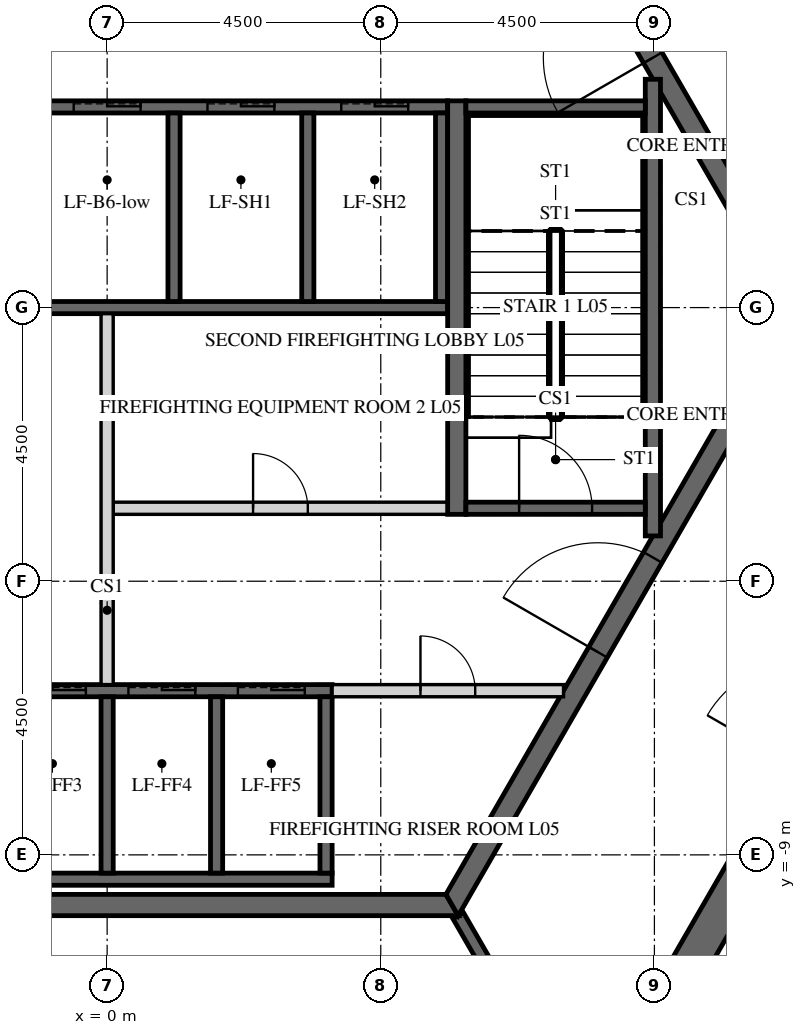
"""IFC4 building model, lengths in metres.
Left out: names, types, materials, properties, quantities, classifications, styles, units other than length and angle.
Written with IfcOpenShell. Run it as: python <this file> out.ifc"""

import sys

from ifc_helpers import new_model, si_unit, direction, frame, frame_2d, origin, place, context, subcontext, project, spatial, polyline, rectangle, outline, extrude, element, fill, save


model = new_model("IFC4")
c1 = context("Model", 3, precision=1e-05, world=origin(), true_north=direction((0.0, 1.0)))
c2 = subcontext(c1, "Body", "Model", "MODEL_VIEW")
j1 = project(units=[si_unit("LENGTHUNIT", "METRE"), si_unit("PLANEANGLEUNIT", "RADIAN")], contexts=[c1])
p1 = place(None, origin())
s1 = spatial("IfcSite", under=j1, at=p1, CompositionType="ELEMENT")
p2 = place(p1, origin())
s2 = spatial("IfcBuilding", under=s1, at=p2, CompositionType="ELEMENT")
p3 = place(p2, frame((0.0, 0.0, 31.5)))
s3 = spatial("IfcBuildingStorey", under=s2, at=p3, CompositionType="ELEMENT", Elevation=31.5)
p4 = place(p3, frame((7.91, -13.7, -0.3), z_axis=(0.0, 0.0, 1.0), x_axis=(0.499999880136, 0.866025472988, 0.0)))
e1 = element("IfcWall", 1, at=p4, inside=s3, PredefinedType="SHEAR", context=c2, shape_type="SweptSolid", body=[
    extrude(outline(polyline([(-0.173, -0.3), (15.993, -0.3), (15.646, 0.3), (0.173, 0.3), (-0.173, -0.3)])), origin(), (0.0, 0.0, 1.0), 6.15),
])
p5 = place(p4, frame((7.039, 0.0, 0.3)))
e2 = element("IfcOpeningElement", 2, at=p5, cuts=e1, PredefinedType="OPENING", context=c2, shape_type="SweptSolid", body=[
    extrude(rectangle(XDim=1.8, YDim=2.4, at=frame_2d((0.9, 1.2))), frame((0.0, 0.31, 0.0), z_axis=(0.0, -1.0, 0.0), x_axis=(1.0, 0.0, 0.0)), (0.0, 0.0, 1.0), 0.62),
])
p6 = place(p3, frame((15.819, 0.0, -0.3), z_axis=(0.0, 0.0, 1.0), x_axis=(-0.499999880136, 0.866025472988, 0.0)))
e3 = element("IfcWall", 3, at=p6, inside=s3, PredefinedType="SHEAR", context=c2, shape_type="SweptSolid", body=[
    extrude(outline(polyline([(-0.173, -0.3), (15.993, -0.3), (15.646, 0.3), (0.173, 0.3), (-0.173, -0.3)])), origin(), (0.0, 0.0, 1.0), 6.15),
])
p7 = place(p6, frame((6.981, 0.0, 0.3)))
e4 = element("IfcOpeningElement", 4, at=p7, cuts=e3, PredefinedType="OPENING", context=c2, shape_type="SweptSolid", body=[
    extrude(rectangle(XDim=1.8, YDim=2.4, at=frame_2d((0.9, 1.2))), frame((0.0, 0.31, 0.0), z_axis=(0.0, -1.0, 0.0), x_axis=(1.0, 0.0, 0.0)), (0.0, 0.0, 1.0), 0.62),
])
p8 = place(p3, frame((-5.673, -9.825, -0.3), z_axis=(0.0, 0.0, 1.0), x_axis=(1.0, 0.0, 0.0)))
e5 = element("IfcWall", 5, at=p8, inside=s3, PredefinedType="SHEAR", context=c2, shape_type="SweptSolid", body=[
    extrude(outline(polyline([(-0.101, -0.175), (11.446, -0.175), (11.244, 0.175), (0.101, 0.175), (-0.101, -0.175)])), origin(), (0.0, 0.0, 1.0), 6.15),
])
p9 = place(p3, frame((5.673, -9.825, -0.3), z_axis=(0.0, 0.0, 1.0), x_axis=(0.499995046907, 0.866028263435, 0.0)))
e6 = element("IfcWall", 6, at=p9, inside=s3, PredefinedType="SHEAR", context=c2, shape_type="SweptSolid", body=[
    extrude(outline(polyline([(-0.101, -0.175), (11.446, -0.175), (11.244, 0.175), (0.101, 0.175), (-0.101, -0.175)])), origin(), (0.0, 0.0, 1.0), 6.15),
])
p10 = place(p9, frame((4.801, 0.0, 0.3)))
e7 = element("IfcOpeningElement", 7, at=p10, cuts=e6, PredefinedType="OPENING", context=c2, shape_type="SweptSolid", body=[
    extrude(rectangle(XDim=1.8, YDim=2.4, at=frame_2d((0.9, 1.2))), frame((0.0, 0.185, 0.0), z_axis=(0.0, -1.0, 0.0), x_axis=(1.0, 0.0, 0.0)), (0.0, 0.0, 1.0), 0.37),
])
p11 = place(p3, frame((11.345, 0.0, -0.3), z_axis=(0.0, 0.0, 1.0), x_axis=(-0.499995046907, 0.866028263435, 0.0)))
e8 = element("IfcWall", 8, at=p11, inside=s3, PredefinedType="SHEAR", context=c2, shape_type="SweptSolid", body=[
    extrude(outline(polyline([(-0.101, -0.175), (11.446, -0.175), (11.244, 0.175), (0.101, 0.175), (-0.101, -0.175)])), origin(), (0.0, 0.0, 1.0), 6.15),
])
p12 = place(p11, frame((4.744, 0.0, 0.3)))
e9 = element("IfcOpeningElement", 9, at=p12, cuts=e8, PredefinedType="OPENING", context=c2, shape_type="SweptSolid", body=[
    extrude(rectangle(XDim=1.8, YDim=2.4, at=frame_2d((0.9, 1.2))), frame((0.0, 0.185, 0.0), z_axis=(0.0, -1.0, 0.0), x_axis=(1.0, 0.0, 0.0)), (0.0, 0.0, 1.0), 0.37),
])
p13 = place(p3, frame((-5.6, 3.3, -0.25), z_axis=(0.0, 0.0, 1.0), x_axis=(1.0, 0.0, 0.0)))
e10 = element("IfcWall", 10, at=p13, inside=s3, PredefinedType="SHEAR", context=c2, shape_type="SweptSolid", body=[
    extrude(rectangle(XDim=11.2, YDim=0.2, at=frame_2d((5.6, 0.0))), origin(), (0.0, 0.0, 1.0), 6.0),
])
p14 = place(p13, frame((0.65, 0.0, 0.25)))
e11 = element("IfcOpeningElement", 11, at=p14, cuts=e10, PredefinedType="OPENING", context=c2, shape_type="SweptSolid", body=[
    extrude(rectangle(XDim=1.1, YDim=2.1, at=frame_2d((0.55, 1.05))), frame((0.0, 0.11, 0.0), z_axis=(0.0, -1.0, 0.0), x_axis=(1.0, 0.0, 0.0)), (0.0, 0.0, 1.0), 0.22),
])
p15 = place(p13, frame((2.85, 0.0, 0.25)))
e12 = element("IfcOpeningElement", 12, at=p15, cuts=e10, PredefinedType="OPENING", context=c2, shape_type="SweptSolid", body=[
    extrude(rectangle(XDim=1.1, YDim=2.1, at=frame_2d((0.55, 1.05))), frame((0.0, 0.11, 0.0), z_axis=(0.0, -1.0, 0.0), x_axis=(1.0, 0.0, 0.0)), (0.0, 0.0, 1.0), 0.22),
])
p16 = place(p13, frame((5.05, 0.0, 0.25)))
e13 = element("IfcOpeningElement", 13, at=p16, cuts=e10, PredefinedType="OPENING", context=c2, shape_type="SweptSolid", body=[
    extrude(rectangle(XDim=1.1, YDim=2.1, at=frame_2d((0.55, 1.05))), frame((0.0, 0.11, 0.0), z_axis=(0.0, -1.0, 0.0), x_axis=(1.0, 0.0, 0.0)), (0.0, 0.0, 1.0), 0.22),
])
p17 = place(p13, frame((7.25, 0.0, 0.25)))
e14 = element("IfcOpeningElement", 14, at=p17, cuts=e10, PredefinedType="OPENING", context=c2, shape_type="SweptSolid", body=[
    extrude(rectangle(XDim=1.1, YDim=2.1, at=frame_2d((0.55, 1.05))), frame((0.0, 0.11, 0.0), z_axis=(0.0, -1.0, 0.0), x_axis=(1.0, 0.0, 0.0)), (0.0, 0.0, 1.0), 0.22),
])
p18 = place(p13, frame((9.45, 0.0, 0.25)))
e15 = element("IfcOpeningElement", 15, at=p18, cuts=e10, PredefinedType="OPENING", context=c2, shape_type="SweptSolid", body=[
    extrude(rectangle(XDim=1.1, YDim=2.1, at=frame_2d((0.55, 1.05))), frame((0.0, 0.11, 0.0), z_axis=(0.0, -1.0, 0.0), x_axis=(1.0, 0.0, 0.0)), (0.0, 0.0, 1.0), 0.22),
])
p19 = place(p3, frame((-5.6, 0.0, -0.25), z_axis=(0.0, 0.0, 1.0), x_axis=(1.0, 0.0, 0.0)))
e16 = element("IfcWall", 16, at=p19, inside=s3, PredefinedType="SHEAR", context=c2, shape_type="SweptSolid", body=[
    extrude(rectangle(XDim=11.2, YDim=0.2, at=frame_2d((5.6, 0.0))), origin(), (0.0, 0.0, 1.0), 6.0),
])
for number, where, z_axis, x_axis in (
    (17, (1.1, 0.1, -0.25), (0.0, 0.0, 1.0), (0.0, 1.0, 0.0)),
    (18, (3.3, 0.1, -0.25), (0.0, 0.0, 1.0), (0.0, 1.0, 0.0)),
    (19, (5.5, 0.1, -0.25), (0.0, 0.0, 1.0), (0.0, 1.0, 0.0)),
):
    element("IfcWall", number, at=place(p3, frame(where, z_axis=z_axis, x_axis=x_axis)), inside=s3, PredefinedType="SHEAR", context=c2, shape_type="SweptSolid", body=[
        extrude(rectangle(XDim=3.1, YDim=0.2, at=frame_2d((1.55, 0.0))), origin(), (0.0, 0.0, 1.0), 6.0),
    ])
p20 = place(p3, frame((-5.5, -6.3, -0.25), z_axis=(0.0, 0.0, 1.0), x_axis=(1.0, 0.0, 0.0)))
e20 = element("IfcWall", 20, at=p20, inside=s3, PredefinedType="SHEAR", context=c2, shape_type="SweptSolid", body=[
    extrude(rectangle(XDim=9.2, YDim=0.2, at=frame_2d((4.6, 0.0))), origin(), (0.0, 0.0, 1.0), 6.0),
])
p21 = place(p20, frame((0.45, 0.0, 0.25)))
e21 = element("IfcOpeningElement", 21, at=p21, cuts=e20, PredefinedType="OPENING", context=c2, shape_type="SweptSolid", body=[
    extrude(rectangle(XDim=1.1, YDim=2.1, at=frame_2d((0.55, 1.05))), frame((0.0, 0.11, 0.0), z_axis=(0.0, -1.0, 0.0), x_axis=(1.0, 0.0, 0.0)), (0.0, 0.0, 1.0), 0.22),
])
p22 = place(p20, frame((2.25, 0.0, 0.25)))
e22 = element("IfcOpeningElement", 22, at=p22, cuts=e20, PredefinedType="OPENING", context=c2, shape_type="SweptSolid", body=[
    extrude(rectangle(XDim=1.1, YDim=2.1, at=frame_2d((0.55, 1.05))), frame((0.0, 0.11, 0.0), z_axis=(0.0, -1.0, 0.0), x_axis=(1.0, 0.0, 0.0)), (0.0, 0.0, 1.0), 0.22),
])
p23 = place(p20, frame((4.05, 0.0, 0.25)))
e23 = element("IfcOpeningElement", 23, at=p23, cuts=e20, PredefinedType="OPENING", context=c2, shape_type="SweptSolid", body=[
    extrude(rectangle(XDim=1.1, YDim=2.1, at=frame_2d((0.55, 1.05))), frame((0.0, 0.11, 0.0), z_axis=(0.0, -1.0, 0.0), x_axis=(1.0, 0.0, 0.0)), (0.0, 0.0, 1.0), 0.22),
])
p24 = place(p20, frame((5.85, 0.0, 0.25)))
e24 = element("IfcOpeningElement", 24, at=p24, cuts=e20, PredefinedType="OPENING", context=c2, shape_type="SweptSolid", body=[
    extrude(rectangle(XDim=1.1, YDim=2.1, at=frame_2d((0.55, 1.05))), frame((0.0, 0.11, 0.0), z_axis=(0.0, -1.0, 0.0), x_axis=(1.0, 0.0, 0.0)), (0.0, 0.0, 1.0), 0.22),
])
p25 = place(p20, frame((7.65, 0.0, 0.25)))
e25 = element("IfcOpeningElement", 25, at=p25, cuts=e20, PredefinedType="OPENING", context=c2, shape_type="SweptSolid", body=[
    extrude(rectangle(XDim=1.1, YDim=2.1, at=frame_2d((0.55, 1.05))), frame((0.0, 0.11, 0.0), z_axis=(0.0, -1.0, 0.0), x_axis=(1.0, 0.0, 0.0)), (0.0, 0.0, 1.0), 0.22),
])
p26 = place(p3, frame((-5.5, -9.4, -0.25), z_axis=(0.0, 0.0, 1.0), x_axis=(1.0, 0.0, 0.0)))
e26 = element("IfcWall", 26, at=p26, inside=s3, PredefinedType="SHEAR", context=c2, shape_type="SweptSolid", body=[
    extrude(rectangle(XDim=9.2, YDim=0.2, at=frame_2d((4.6, 0.0))), origin(), (0.0, 0.0, 1.0), 6.0),
])
for number, where, z_axis, x_axis in (
    (27, (0.0, -9.3, -0.25), (0.0, 0.0, 1.0), (0.0, 1.0, 0.0)),
    (28, (1.8, -9.3, -0.25), (0.0, 0.0, 1.0), (0.0, 1.0, 0.0)),
    (29, (3.6, -9.3, -0.25), (0.0, 0.0, 1.0), (0.0, 1.0, 0.0)),
):
    element("IfcWall", number, at=place(p3, frame(where, z_axis=z_axis, x_axis=x_axis)), inside=s3, PredefinedType="SHEAR", context=c2, shape_type="SweptSolid", body=[
        extrude(rectangle(XDim=2.9, YDim=0.2, at=frame_2d((1.45, 0.0))), origin(), (0.0, 0.0, 1.0), 6.0),
    ])
p27 = place(p3, frame((0.1, -3.3, 0.0), z_axis=(0.0, 0.0, 1.0), x_axis=(1.0, 0.0, 0.0)))
e30 = element("IfcWall", 30, at=p27, inside=s3, PredefinedType="PARTITIONING", context=c2, shape_type="SweptSolid", body=[
    extrude(rectangle(XDim=5.5, YDim=0.2, at=frame_2d((2.75, 0.0))), origin(), (0.0, 0.0, 1.0), 5.75),
])
p28 = place(p27, frame((2.3, 0.0, 0.0)))
e31 = element("IfcOpeningElement", 31, at=p28, cuts=e30, PredefinedType="OPENING", context=c2, shape_type="SweptSolid", body=[
    extrude(rectangle(XDim=0.9, YDim=2.1, at=frame_2d((0.45, 1.05))), frame((0.0, 0.11, 0.0), z_axis=(0.0, -1.0, 0.0), x_axis=(1.0, 0.0, 0.0)), (0.0, 0.0, 1.0), 0.22),
])
p29 = place(p3, frame((0.0, -6.2, 0.0), z_axis=(0.0, 0.0, 1.0), x_axis=(0.0, 1.0, 0.0)))
e32 = element("IfcWall", 32, at=p29, inside=s3, PredefinedType="PARTITIONING", context=c2, shape_type="SweptSolid", body=[
    extrude(rectangle(XDim=6.1, YDim=0.2, at=frame_2d((3.05, 0.0))), origin(), (0.0, 0.0, 1.0), 5.75),
])
p30 = place(p3, frame((3.7, -6.3, 0.0), z_axis=(0.0, 0.0, 1.0), x_axis=(1.0, 0.0, 0.0)))
e33 = element("IfcWall", 33, at=p30, inside=s3, PredefinedType="PARTITIONING", context=c2, shape_type="SweptSolid", body=[
    extrude(rectangle(XDim=3.806, YDim=0.2, at=frame_2d((1.903, 0.0))), origin(), (0.0, 0.0, 1.0), 5.75),
])
p31 = place(p30, frame((1.453, 0.0, 0.0)))
e34 = element("IfcOpeningElement", 34, at=p31, cuts=e33, PredefinedType="OPENING", context=c2, shape_type="SweptSolid", body=[
    extrude(rectangle(XDim=0.9, YDim=2.1, at=frame_2d((0.45, 1.05))), frame((0.0, 0.11, 0.0), z_axis=(0.0, -1.0, 0.0), x_axis=(1.0, 0.0, 0.0)), (0.0, 0.0, 1.0), 0.22),
])
p32 = place(p3, frame((5.773, -10.0, -0.3), z_axis=(0.0, 0.0, 1.0), x_axis=(0.500038251005, -0.86600331843, 0.0)))
e35 = element("IfcWall", 35, at=p32, inside=s3, PredefinedType="SHEAR", context=c2, shape_type="SweptSolid", body=[
    extrude(rectangle(XDim=3.926, YDim=0.2, at=frame_2d((1.963, 0.0))), origin(), (0.0, 0.0, 1.0), 6.15),
])
p33 = place(p3, frame((5.75, -3.4, -0.25), z_axis=(0.0, 0.0, 1.0), x_axis=(0.0, 1.0, 0.0)))
e36 = element("IfcWall", 36, at=p33, inside=s3, PredefinedType="SHEAR", context=c2, shape_type="SweptSolid", body=[
    extrude(rectangle(XDim=6.8, YDim=0.3, at=frame_2d((3.4, 0.0))), origin(), (0.0, 0.0, 1.0), 6.0),
])
p34 = place(p3, frame((8.975, -3.755, -0.25), z_axis=(0.0, 0.0, 1.0), x_axis=(0.0, 1.0, 0.0)))
e37 = element("IfcWall", 37, at=p34, inside=s3, PredefinedType="SHEAR", context=c2, shape_type="SweptSolid", body=[
    extrude(rectangle(XDim=7.51, YDim=0.25, at=frame_2d((3.755, 0.0))), origin(), (0.0, 0.0, 1.0), 6.0),
])
p35 = place(p3, frame((5.9, 3.3, -0.25), z_axis=(0.0, 0.0, 1.0), x_axis=(1.0, 0.0, 0.0)))
e38 = element("IfcWall", 38, at=p35, inside=s3, PredefinedType="SHEAR", context=c2, shape_type="SweptSolid", body=[
    extrude(rectangle(XDim=2.95, YDim=0.2, at=frame_2d((1.475, 0.0))), origin(), (0.0, 0.0, 1.0), 6.0),
])
p36 = place(p3, frame((5.9, -3.3, -0.25), z_axis=(0.0, 0.0, 1.0), x_axis=(1.0, 0.0, 0.0)))
e39 = element("IfcWall", 39, at=p36, inside=s3, PredefinedType="SHEAR", context=c2, shape_type="SweptSolid", body=[
    extrude(rectangle(XDim=2.95, YDim=0.2, at=frame_2d((1.475, 0.0))), origin(), (0.0, 0.0, 1.0), 6.0),
])
p37 = place(p36, frame((0.875, 0.0, 0.25)))
e40 = element("IfcOpeningElement", 40, at=p37, cuts=e39, PredefinedType="OPENING", context=c2, shape_type="SweptSolid", body=[
    extrude(rectangle(XDim=1.2, YDim=2.4, at=frame_2d((0.6, 1.2))), frame((0.0, 0.11, 0.0), z_axis=(0.0, -1.0, 0.0), x_axis=(1.0, 0.0, 0.0)), (0.0, 0.0, 1.0), 0.22),
])
p38 = place(p3, frame((18.513, 2.734, 0.0), z_axis=(0.0, 0.0, 1.0), x_axis=(-0.499982347303, 0.866035595334, 0.0)))
e41 = element("IfcWall", 41, at=p38, inside=s3, PredefinedType="PARTITIONING", context=c2, shape_type="SweptSolid", body=[
    extrude(rectangle(XDim=16.588, YDim=0.2, at=frame_2d((8.294, 0.0))), origin(), (0.0, 0.0, 1.0), 5.85),
])
p39 = place(p12, origin())
e42 = element("IfcDoor", 42, at=p39, inside=s3, OperationType="DOUBLE_DOOR_SINGLE_SWING", PredefinedType="DOOR", context=c2, shape_type="SweptSolid", body=[
    extrude(rectangle(XDim=1.8, YDim=2.4, at=frame_2d((0.9, 1.2))), frame((0.0, 0.025, 0.0), z_axis=(0.0, -1.0, 0.0), x_axis=(1.0, 0.0, 0.0)), (0.0, 0.0, 1.0), 0.05),
])
fill(e9, e42)
p40 = place(p10, origin())
e43 = element("IfcDoor", 43, at=p40, inside=s3, OperationType="DOUBLE_DOOR_SINGLE_SWING", PredefinedType="DOOR", context=c2, shape_type="SweptSolid", body=[
    extrude(rectangle(XDim=1.8, YDim=2.4, at=frame_2d((0.9, 1.2))), frame((0.0, 0.025, 0.0), z_axis=(0.0, -1.0, 0.0), x_axis=(1.0, 0.0, 0.0)), (0.0, 0.0, 1.0), 0.05),
])
fill(e7, e43)
p41 = place(p28, origin())
e44 = element("IfcDoor", 44, at=p41, inside=s3, OperationType="SINGLE_SWING_LEFT", PredefinedType="DOOR", context=c2, shape_type="SweptSolid", body=[
    extrude(rectangle(XDim=0.9, YDim=2.1, at=frame_2d((0.45, 1.05))), frame((0.0, 0.025, 0.0), z_axis=(0.0, -1.0, 0.0), x_axis=(1.0, 0.0, 0.0)), (0.0, 0.0, 1.0), 0.05),
])
fill(e31, e44)
p42 = place(p31, origin())
e45 = element("IfcDoor", 45, at=p42, inside=s3, OperationType="SINGLE_SWING_LEFT", PredefinedType="DOOR", context=c2, shape_type="SweptSolid", body=[
    extrude(rectangle(XDim=0.9, YDim=2.1, at=frame_2d((0.45, 1.05))), frame((0.0, 0.025, 0.0), z_axis=(0.0, -1.0, 0.0), x_axis=(1.0, 0.0, 0.0)), (0.0, 0.0, 1.0), 0.05),
])
fill(e34, e45)
p43 = place(p37, origin())
e46 = element("IfcDoor", 46, at=p43, inside=s3, OperationType="SINGLE_SWING_LEFT", PredefinedType="DOOR", context=c2, shape_type="SweptSolid", body=[
    extrude(rectangle(XDim=1.2, YDim=2.4, at=frame_2d((0.6, 1.2))), frame((0.0, 0.025, 0.0), z_axis=(0.0, -1.0, 0.0), x_axis=(1.0, 0.0, 0.0)), (0.0, 0.0, 1.0), 0.05),
])
fill(e40, e46)
p44 = place(p16, origin())
e47 = element("IfcDoor", 47, at=p44, inside=s3, OperationType="SLIDING_TO_LEFT", PredefinedType="DOOR", context=c2, shape_type="SweptSolid", body=[
    extrude(rectangle(XDim=1.1, YDim=2.1, at=frame_2d((0.55, 1.05))), frame((0.0, 0.025, 0.0), z_axis=(0.0, -1.0, 0.0), x_axis=(1.0, 0.0, 0.0)), (0.0, 0.0, 1.0), 0.05),
])
fill(e13, e47)
p45 = place(p17, origin())
e48 = element("IfcDoor", 48, at=p45, inside=s3, OperationType="SLIDING_TO_LEFT", PredefinedType="DOOR", context=c2, shape_type="SweptSolid", body=[
    extrude(rectangle(XDim=1.1, YDim=2.1, at=frame_2d((0.55, 1.05))), frame((0.0, 0.025, 0.0), z_axis=(0.0, -1.0, 0.0), x_axis=(1.0, 0.0, 0.0)), (0.0, 0.0, 1.0), 0.05),
])
fill(e14, e48)
p46 = place(p18, origin())
e49 = element("IfcDoor", 49, at=p46, inside=s3, OperationType="SLIDING_TO_LEFT", PredefinedType="DOOR", context=c2, shape_type="SweptSolid", body=[
    extrude(rectangle(XDim=1.1, YDim=2.1, at=frame_2d((0.55, 1.05))), frame((0.0, 0.025, 0.0), z_axis=(0.0, -1.0, 0.0), x_axis=(1.0, 0.0, 0.0)), (0.0, 0.0, 1.0), 0.05),
])
fill(e15, e49)
p47 = place(p23, origin())
e50 = element("IfcDoor", 50, at=p47, inside=s3, OperationType="SLIDING_TO_LEFT", PredefinedType="DOOR", context=c2, shape_type="SweptSolid", body=[
    extrude(rectangle(XDim=1.1, YDim=2.1, at=frame_2d((0.55, 1.05))), frame((0.0, 0.025, 0.0), z_axis=(0.0, -1.0, 0.0), x_axis=(1.0, 0.0, 0.0)), (0.0, 0.0, 1.0), 0.05),
])
fill(e23, e50)
p48 = place(p24, origin())
e51 = element("IfcDoor", 51, at=p48, inside=s3, OperationType="SLIDING_TO_LEFT", PredefinedType="DOOR", context=c2, shape_type="SweptSolid", body=[
    extrude(rectangle(XDim=1.1, YDim=2.1, at=frame_2d((0.55, 1.05))), frame((0.0, 0.025, 0.0), z_axis=(0.0, -1.0, 0.0), x_axis=(1.0, 0.0, 0.0)), (0.0, 0.0, 1.0), 0.05),
])
fill(e24, e51)
p49 = place(p25, origin())
e52 = element("IfcDoor", 52, at=p49, inside=s3, OperationType="SLIDING_TO_LEFT", PredefinedType="DOOR", context=c2, shape_type="SweptSolid", body=[
    extrude(rectangle(XDim=1.1, YDim=2.1, at=frame_2d((0.55, 1.05))), frame((0.0, 0.025, 0.0), z_axis=(0.0, -1.0, 0.0), x_axis=(1.0, 0.0, 0.0)), (0.0, 0.0, 1.0), 0.05),
])
fill(e25, e52)
save(model, sys.argv[1])
